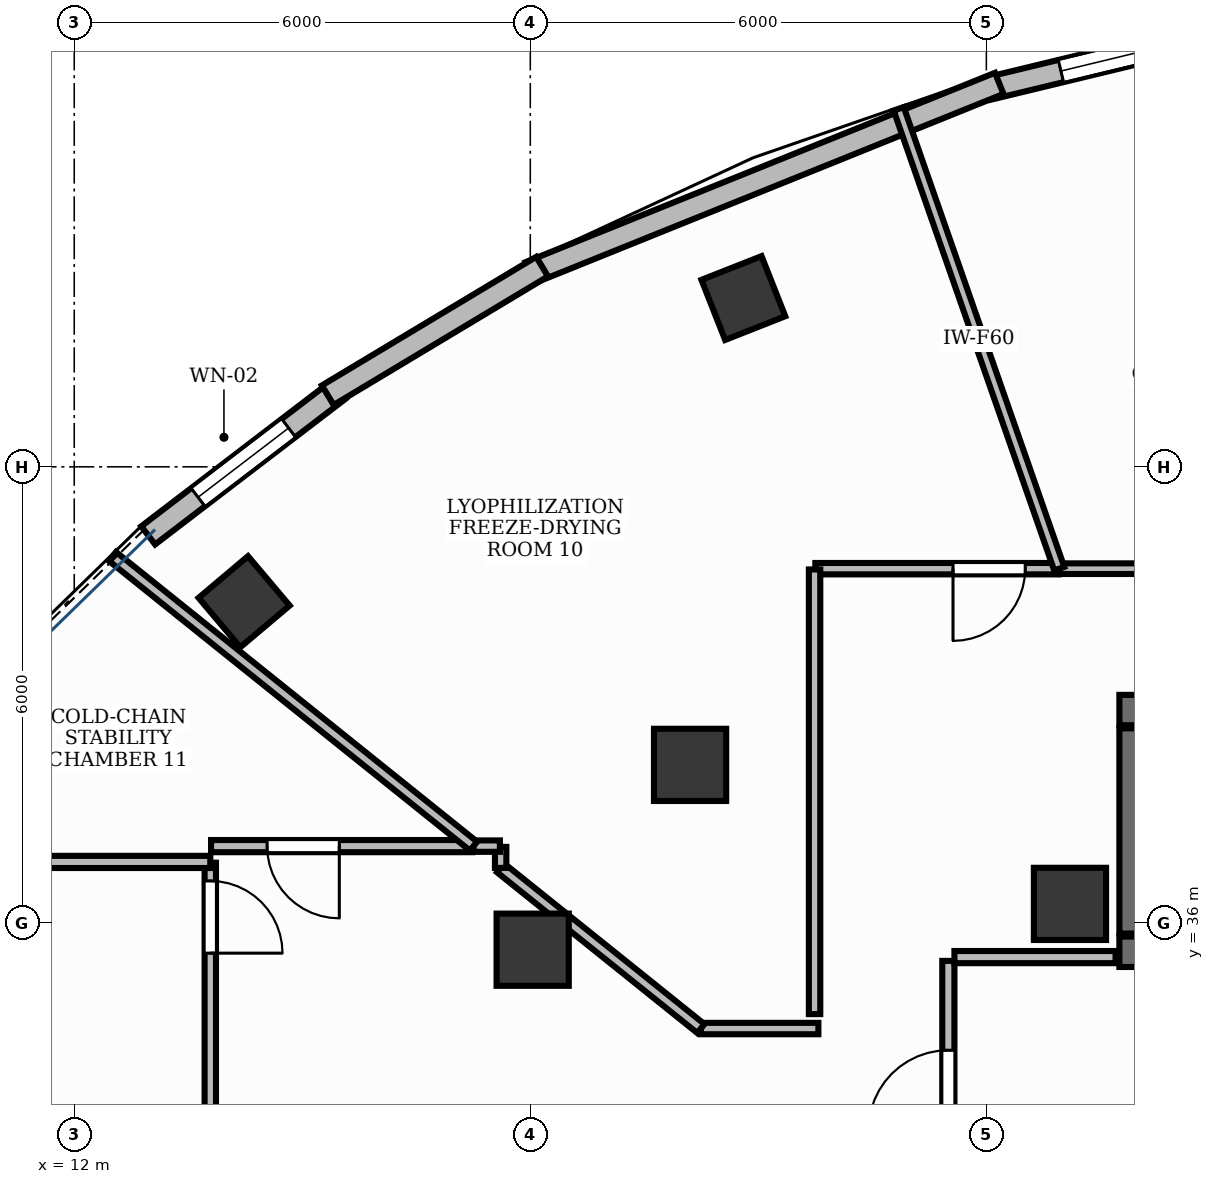
"""IFC4 building model, lengths in metres.
Left out: names, types, materials, properties, quantities, classifications, styles, units other than length and angle.
Written with IfcOpenShell. Run it as: python <this file> out.ifc"""

import sys

from ifc_helpers import new_model, si_unit, direction, frame, frame_2d, origin, origin_2d, place, context, subcontext, project, spatial, rectangle, extrude, element, fill, save


model = new_model("IFC4")
c1 = context("Model", 3, precision=1e-05, world=origin(), true_north=direction((0.0, 1.0)))
c2 = subcontext(c1, "Body", "Model", "MODEL_VIEW")
j1 = project(units=[si_unit("LENGTHUNIT", "METRE"), si_unit("PLANEANGLEUNIT", "RADIAN")], contexts=[c1])
p1 = place(None, origin())
s1 = spatial("IfcSite", under=j1, at=p1, CompositionType="ELEMENT")
p2 = place(p1, origin())
s2 = spatial("IfcBuilding", under=s1, at=p2, CompositionType="ELEMENT")
p3 = place(p2, frame((0.0, 0.0, 243.6)))
s3 = spatial("IfcBuildingStorey", under=s2, at=p3, CompositionType="ELEMENT", Elevation=243.6)
p4 = place(p3, frame((25.75, 38.8, 0.0), z_axis=(0.0, 0.0, 1.0), x_axis=(1.0, 0.0, 0.0)))
e1 = element("IfcWall", 1, at=p4, inside=s3, PredefinedType="SHEAR", context=c2, shape_type="SweptSolid", body=[
    extrude(rectangle(XDim=3.1, YDim=0.4, at=frame_2d((1.55, 0.0))), origin(), (0.0, 0.0, 1.0), 3.9),
])
p5 = place(p3, frame((25.75, 35.62, 0.0), z_axis=(0.0, 0.0, 1.0), x_axis=(1.0, 0.0, 0.0)))
e2 = element("IfcWall", 2, at=p5, inside=s3, PredefinedType="SHEAR", context=c2, shape_type="SweptSolid", body=[
    extrude(rectangle(XDim=3.1, YDim=0.4, at=frame_2d((1.55, 0.0))), origin(), (0.0, 0.0, 1.0), 3.9),
])
p6 = place(p5, frame((0.9, 0.0, 0.0)))
e3 = element("IfcOpeningElement", 3, at=p6, cuts=e2, PredefinedType="OPENING", context=c2, shape_type="SweptSolid", body=[
    extrude(rectangle(XDim=1.3, YDim=2.2, at=frame_2d((0.65, 1.1))), frame((0.0, 0.215, 0.0), z_axis=(0.0, -1.0, 0.0), x_axis=(1.0, 0.0, 0.0)), (0.0, 0.0, 1.0), 0.43),
])
p7 = place(p3, frame((25.95, 35.86, 0.0), z_axis=(0.0, 0.0, 1.0), x_axis=(0.0, 1.0, 0.0)))
e4 = element("IfcWall", 4, at=p7, inside=s3, PredefinedType="SHEAR", context=c2, shape_type="SweptSolid", body=[
    extrude(rectangle(XDim=2.7, YDim=0.4, at=frame_2d((1.35, 0.0))), origin(), (0.0, 0.0, 1.0), 3.9),
])
p8 = place(p3, frame((25.1, 36.25, -0.0), z_axis=(0.0, 0.0, 1.0), x_axis=(1.0, 0.0, 0.0)))
e5 = element("IfcColumn", 5, at=p8, inside=s3, PredefinedType="PILASTER", context=c2, shape_type="SweptSolid", body=[
    extrude(rectangle(XDim=0.95, YDim=0.95, at=origin_2d()), origin(), (0.0, 0.0, 1.0), 3.901),
])
for number, where, z_axis, x_axis in (
    (6, (20.803, 44.22, -0.0), (0.0, 0.0, 1.0), (0.93, 0.367, 0.0)),
    (7, (14.235, 40.225, -0.0), (0.0, 0.0, 1.0), (0.764, 0.645, 0.0)),
):
    element("IfcColumn", number, at=place(p3, frame(where, z_axis=z_axis, x_axis=x_axis)), inside=s3, PredefinedType="COLUMN", context=c2, shape_type="SweptSolid", body=[
        extrude(rectangle(XDim=0.85, YDim=0.85, at=origin_2d()), origin(), (0.0, 0.0, 1.0), 3.901),
    ])
for number, where, z_axis, x_axis in (
    (8, (20.102, 38.079, -0.0), (0.0, 0.0, 1.0), (1.0, 0.0, 0.0)),
    (9, (18.031, 35.647, -0.0), (0.0, 0.0, 1.0), (1.0, 0.0, 0.0)),
):
    element("IfcColumn", number, at=place(p3, frame(where, z_axis=z_axis, x_axis=x_axis)), inside=s3, PredefinedType="COLUMN", context=c2, shape_type="SweptSolid", body=[
        extrude(rectangle(XDim=0.95, YDim=0.95, at=origin_2d()), origin(), (0.0, 0.0, 1.0), 3.901),
    ])
p9 = place(p3, frame((27.397, 47.791, 0.0), z_axis=(0.0, 0.0, 1.0), x_axis=(-0.972019132567, -0.23490169417, 0.0)))
e10 = element("IfcWall", 10, at=p9, inside=s3, PredefinedType="STANDARD", context=c2, shape_type="SweptSolid", body=[
    extrude(rectangle(XDim=3.472, YDim=0.3, at=frame_2d((1.736, 0.0))), origin(), (0.0, 0.0, 1.0), 3.9),
])
p10 = place(p9, frame((0.986, 0.0, 0.95)))
e11 = element("IfcOpeningElement", 11, at=p10, cuts=e10, PredefinedType="OPENING", context=c2, shape_type="SweptSolid", body=[
    extrude(rectangle(XDim=1.5, YDim=1.8, at=frame_2d((0.75, 0.9))), frame((0.0, 0.165, 0.0), z_axis=(0.0, -1.0, 0.0), x_axis=(1.0, 0.0, 0.0)), (0.0, 0.0, 1.0), 0.33),
])
p11 = place(p3, frame((15.477, 43.013, 0.0), z_axis=(0.0, 0.0, 1.0), x_axis=(-0.794379815394, -0.607421360255, 0.0)))
e12 = element("IfcWall", 12, at=p11, inside=s3, PredefinedType="STANDARD", context=c2, shape_type="SweptSolid", body=[
    extrude(rectangle(XDim=3.152, YDim=0.3, at=frame_2d((1.576, 0.0))), origin(), (0.0, 0.0, 1.0), 3.9),
])
p12 = place(p11, frame((0.826, 0.0, 0.95)))
e13 = element("IfcOpeningElement", 13, at=p12, cuts=e12, PredefinedType="OPENING", context=c2, shape_type="SweptSolid", body=[
    extrude(rectangle(XDim=1.5, YDim=1.8, at=frame_2d((0.75, 0.9))), frame((0.0, 0.165, 0.0), z_axis=(0.0, -1.0, 0.0), x_axis=(1.0, 0.0, 0.0)), (0.0, 0.0, 1.0), 0.33),
])
p13 = place(p3, frame((24.17, 47.045, 0.0), z_axis=(0.0, 0.0, 1.0), x_axis=(-0.927372969182, -0.374138177725, 0.0)))
e14 = element("IfcWall", 14, at=p13, inside=s3, PredefinedType="STANDARD", context=c2, shape_type="SweptSolid", body=[
    extrude(rectangle(XDim=6.66, YDim=0.3, at=frame_2d((3.33, 0.0))), origin(), (0.0, 0.0, 1.0), 3.9),
])
p14 = place(p3, frame((18.155, 44.634, 0.0), z_axis=(0.0, 0.0, 1.0), x_axis=(-0.857525678966, -0.514441162732, 0.0)))
e15 = element("IfcWall", 15, at=p14, inside=s3, PredefinedType="STANDARD", context=c2, shape_type="SweptSolid", body=[
    extrude(rectangle(XDim=3.288, YDim=0.3, at=frame_2d((1.644, 0.0))), origin(), (0.0, 0.0, 1.0), 3.9),
])
p15 = place(p3, frame((23.5, 32.1, 0.0), z_axis=(0.0, 0.0, 1.0), x_axis=(0.0, 1.0, 0.0)))
e16 = element("IfcWall", 16, at=p15, inside=s3, PredefinedType="PARTITIONING", context=c2, shape_type="SweptSolid", body=[
    extrude(rectangle(XDim=3.4, YDim=0.16, at=frame_2d((1.7, 0.0))), origin(), (0.0, 0.0, 1.0), 2.91),
])
p16 = place(p15, frame((1.175, 0.0, 0.0)))
e17 = element("IfcOpeningElement", 17, at=p16, cuts=e16, PredefinedType="OPENING", context=c2, shape_type="SweptSolid", body=[
    extrude(rectangle(XDim=1.05, YDim=2.15, at=frame_2d((0.525, 1.075))), frame((0.0, 0.095, 0.0), z_axis=(0.0, -1.0, 0.0), x_axis=(1.0, 0.0, 0.0)), (0.0, 0.0, 1.0), 0.19),
])
p17 = place(p3, frame((23.58, 35.55, 0.0), z_axis=(0.0, 0.0, 1.0), x_axis=(1.0, 0.0, 0.0)))
e18 = element("IfcWall", 18, at=p17, inside=s3, PredefinedType="PARTITIONING", context=c2, shape_type="SweptSolid", body=[
    extrude(rectangle(XDim=2.12, YDim=0.16, at=frame_2d((1.06, 0.0))), origin(), (0.0, 0.0, 1.0), 2.91),
])
p18 = place(p3, frame((31.267, 40.66, 0.0), z_axis=(0.0, 0.0, 1.0), x_axis=(-1.0, 0.0, 0.0)))
e19 = element("IfcWall", 19, at=p18, inside=s3, PredefinedType="PARTITIONING", context=c2, shape_type="SweptSolid", body=[
    extrude(rectangle(XDim=6.308, YDim=0.14, at=frame_2d((3.154, 0.0))), origin(), (0.0, 0.0, 1.0), 2.91),
])
p19 = place(p18, frame((0.24, 0.0, 0.0)))
e20 = element("IfcOpeningElement", 20, at=p19, cuts=e19, PredefinedType="OPENING", context=c2, shape_type="SweptSolid", body=[
    extrude(rectangle(XDim=0.95, YDim=2.15, at=frame_2d((0.475, 1.075))), frame((0.0, 0.085, 0.0), z_axis=(0.0, -1.0, 0.0), x_axis=(1.0, 0.0, 0.0)), (0.0, 0.0, 1.0), 0.17),
])
p20 = place(p3, frame((24.948, 40.66, 0.0), z_axis=(0.0, 0.0, 1.0), x_axis=(-1.0, 0.0, 0.0)))
e21 = element("IfcWall", 21, at=p20, inside=s3, PredefinedType="PARTITIONING", context=c2, shape_type="SweptSolid", body=[
    extrude(rectangle(XDim=3.198, YDim=0.15, at=frame_2d((1.599, 0.0))), origin(), (0.0, 0.0, 1.0), 2.91),
])
p21 = place(p20, frame((0.437, 0.0, 0.0)))
e22 = element("IfcOpeningElement", 22, at=p21, cuts=e21, PredefinedType="OPENING", context=c2, shape_type="SweptSolid", body=[
    extrude(rectangle(XDim=0.95, YDim=2.15, at=frame_2d((0.475, 1.075))), frame((0.0, 0.09, 0.0), z_axis=(0.0, -1.0, 0.0), x_axis=(1.0, 0.0, 0.0)), (0.0, 0.0, 1.0), 0.18),
])
p22 = place(p3, frame((17.237, 37.01, 0.0), z_axis=(0.0, 0.0, 1.0), x_axis=(-1.0, 0.0, 0.0)))
e23 = element("IfcWall", 23, at=p22, inside=s3, PredefinedType="PARTITIONING", context=c2, shape_type="SweptSolid", body=[
    extrude(rectangle(XDim=3.437, YDim=0.16, at=frame_2d((1.718, 0.0))), origin(), (0.0, 0.0, 1.0), 2.91),
])
p23 = place(p22, frame((1.75, 0.0, 0.0)))
e24 = element("IfcOpeningElement", 24, at=p23, cuts=e23, PredefinedType="OPENING", context=c2, shape_type="SweptSolid", body=[
    extrude(rectangle(XDim=0.95, YDim=2.15, at=frame_2d((0.475, 1.075))), frame((0.0, 0.095, 0.0), z_axis=(0.0, -1.0, 0.0), x_axis=(1.0, 0.0, 0.0)), (0.0, 0.0, 1.0), 0.19),
])
p24 = place(p3, frame((13.79, 36.792, 0.0), z_axis=(0.0, 0.0, 1.0), x_axis=(0.0, -1.0, 0.0)))
e25 = element("IfcWall", 25, at=p24, inside=s3, PredefinedType="PARTITIONING", context=c2, shape_type="SweptSolid", body=[
    extrude(rectangle(XDim=4.782, YDim=0.15, at=frame_2d((2.391, 0.0))), origin(), (0.0, 0.0, 1.0), 2.91),
])
p25 = place(p24, frame((0.24, 0.0, 0.0)))
e26 = element("IfcOpeningElement", 26, at=p25, cuts=e25, PredefinedType="OPENING", context=c2, shape_type="SweptSolid", body=[
    extrude(rectangle(XDim=0.95, YDim=2.15, at=frame_2d((0.475, 1.075))), frame((0.0, 0.09, 0.0), z_axis=(0.0, -1.0, 0.0), x_axis=(1.0, 0.0, 0.0)), (0.0, 0.0, 1.0), 0.18),
])
p26 = place(p3, frame((24.959, 40.66, 0.0), z_axis=(0.0, 0.0, 1.0), x_axis=(-0.329537269445, 0.944142567649, 0.0)))
e27 = element("IfcWall", 27, at=p26, inside=s3, PredefinedType="PARTITIONING", context=c2, shape_type="SweptSolid", body=[
    extrude(rectangle(XDim=6.407, YDim=0.14, at=frame_2d((3.204, 0.0))), origin(), (0.0, 0.0, 1.0), 2.91),
])
p27 = place(p3, frame((21.74, 40.65, 0.0), z_axis=(0.0, 0.0, 1.0), x_axis=(0.0, -1.0, 0.0)))
e28 = element("IfcWall", 28, at=p27, inside=s3, PredefinedType="PARTITIONING", context=c2, shape_type="SweptSolid", body=[
    extrude(rectangle(XDim=5.85, YDim=0.15, at=frame_2d((2.925, 0.0))), origin(), (0.0, 0.0, 1.0), 2.91),
])
p28 = place(p3, frame((21.79, 34.61, 0.0), z_axis=(0.0, 0.0, 1.0), x_axis=(-1.0, 0.0, 0.0)))
e29 = element("IfcWall", 29, at=p28, inside=s3, PredefinedType="PARTITIONING", context=c2, shape_type="SweptSolid", body=[
    extrude(rectangle(XDim=1.546, YDim=0.15, at=frame_2d((0.773, 0.0))), origin(), (0.0, 0.0, 1.0), 2.91),
])
p29 = place(p3, frame((20.244, 34.61, 0.0), z_axis=(0.0, 0.0, 1.0), x_axis=(-0.779965134007, 0.625822969963, 0.0)))
e30 = element("IfcWall", 30, at=p29, inside=s3, PredefinedType="PARTITIONING", context=c2, shape_type="SweptSolid", body=[
    extrude(rectangle(XDim=3.377, YDim=0.15, at=frame_2d((1.688, 0.0))), origin(), (0.0, 0.0, 1.0), 2.91),
])
p30 = place(p3, frame((17.61, 36.723, 0.0), z_axis=(0.0, 0.0, 1.0), x_axis=(0.0, 1.0, 0.0)))
e31 = element("IfcWall", 31, at=p30, inside=s3, PredefinedType="PARTITIONING", context=c2, shape_type="SweptSolid", body=[
    extrude(rectangle(XDim=0.277, YDim=0.15, at=frame_2d((0.138, 0.0))), origin(), (0.0, 0.0, 1.0), 2.91),
])
p31 = place(p3, frame((17.6, 37.01, 0.0), z_axis=(0.0, 0.0, 1.0), x_axis=(-1.0, 0.0, 0.0)))
e32 = element("IfcWall", 32, at=p31, inside=s3, PredefinedType="PARTITIONING", context=c2, shape_type="SweptSolid", body=[
    extrude(rectangle(XDim=0.347, YDim=0.15, at=frame_2d((0.174, 0.0))), origin(), (0.0, 0.0, 1.0), 2.91),
])
p32 = place(p3, frame((17.253, 37.01, 0.0), z_axis=(0.0, 0.0, 1.0), x_axis=(-0.779948830135, 0.625843288987, 0.0)))
e33 = element("IfcWall", 33, at=p32, inside=s3, PredefinedType="PARTITIONING", context=c2, shape_type="SweptSolid", body=[
    extrude(rectangle(XDim=6.09, YDim=0.15, at=frame_2d((3.045, 0.0))), origin(), (0.0, 0.0, 1.0), 2.91),
])
p33 = place(p3, frame((13.79, 36.802, 0.0), z_axis=(0.0, 0.0, 1.0), x_axis=(-1.0, 0.0, 0.0)))
e34 = element("IfcWall", 34, at=p33, inside=s3, PredefinedType="PARTITIONING", context=c2, shape_type="SweptSolid", body=[
    extrude(rectangle(XDim=4.772, YDim=0.16, at=frame_2d((2.386, 0.0))), origin(), (0.0, 0.0, 1.0), 2.91),
])
p34 = place(p10, origin())
e35 = element("IfcWindow", 35, at=p34, inside=s3, PartitioningType="DOUBLE_PANEL_VERTICAL", PredefinedType="WINDOW", context=c2, shape_type="SweptSolid", body=[
    extrude(rectangle(XDim=1.5, YDim=1.8, at=frame_2d((0.75, 0.9))), frame((0.0, 0.03, 0.0), z_axis=(0.0, -1.0, 0.0), x_axis=(1.0, 0.0, 0.0)), (0.0, 0.0, 1.0), 0.06),
])
fill(e11, e35)
p35 = place(p12, origin())
e36 = element("IfcWindow", 36, at=p35, inside=s3, PartitioningType="DOUBLE_PANEL_VERTICAL", PredefinedType="WINDOW", context=c2, shape_type="SweptSolid", body=[
    extrude(rectangle(XDim=1.5, YDim=1.8, at=frame_2d((0.75, 0.9))), frame((0.0, 0.03, 0.0), z_axis=(0.0, -1.0, 0.0), x_axis=(1.0, 0.0, 0.0)), (0.0, 0.0, 1.0), 0.06),
])
fill(e13, e36)
p36 = place(p16, origin())
e37 = element("IfcDoor", 37, at=p36, inside=s3, OperationType="SINGLE_SWING_LEFT", PredefinedType="DOOR", context=c2, shape_type="SweptSolid", body=[
    extrude(rectangle(XDim=1.05, YDim=2.15, at=frame_2d((0.525, 1.075))), frame((0.0, 0.025, 0.0), z_axis=(0.0, -1.0, 0.0), x_axis=(1.0, 0.0, 0.0)), (0.0, 0.0, 1.0), 0.05),
])
fill(e17, e37)
p37 = place(p21, origin())
e38 = element("IfcDoor", 38, at=p37, inside=s3, OperationType="SINGLE_SWING_RIGHT", PredefinedType="DOOR", context=c2, shape_type="SweptSolid", body=[
    extrude(rectangle(XDim=0.95, YDim=2.15, at=frame_2d((0.475, 1.075))), frame((0.0, 0.025, 0.0), z_axis=(0.0, -1.0, 0.0), x_axis=(1.0, 0.0, 0.0)), (0.0, 0.0, 1.0), 0.05),
])
fill(e22, e38)
p38 = place(p23, origin())
e39 = element("IfcDoor", 39, at=p38, inside=s3, OperationType="SINGLE_SWING_LEFT", PredefinedType="DOOR", context=c2, shape_type="SweptSolid", body=[
    extrude(rectangle(XDim=0.95, YDim=2.15, at=frame_2d((0.475, 1.075))), frame((0.0, 0.025, 0.0), z_axis=(0.0, -1.0, 0.0), x_axis=(1.0, 0.0, 0.0)), (0.0, 0.0, 1.0), 0.05),
])
fill(e24, e39)
p39 = place(p25, origin())
e40 = element("IfcDoor", 40, at=p39, inside=s3, OperationType="SINGLE_SWING_RIGHT", PredefinedType="DOOR", context=c2, shape_type="SweptSolid", body=[
    extrude(rectangle(XDim=0.95, YDim=2.15, at=frame_2d((0.475, 1.075))), frame((0.0, 0.025, 0.0), z_axis=(0.0, -1.0, 0.0), x_axis=(1.0, 0.0, 0.0)), (0.0, 0.0, 1.0), 0.05),
])
fill(e26, e40)
save(model, sys.argv[1])
